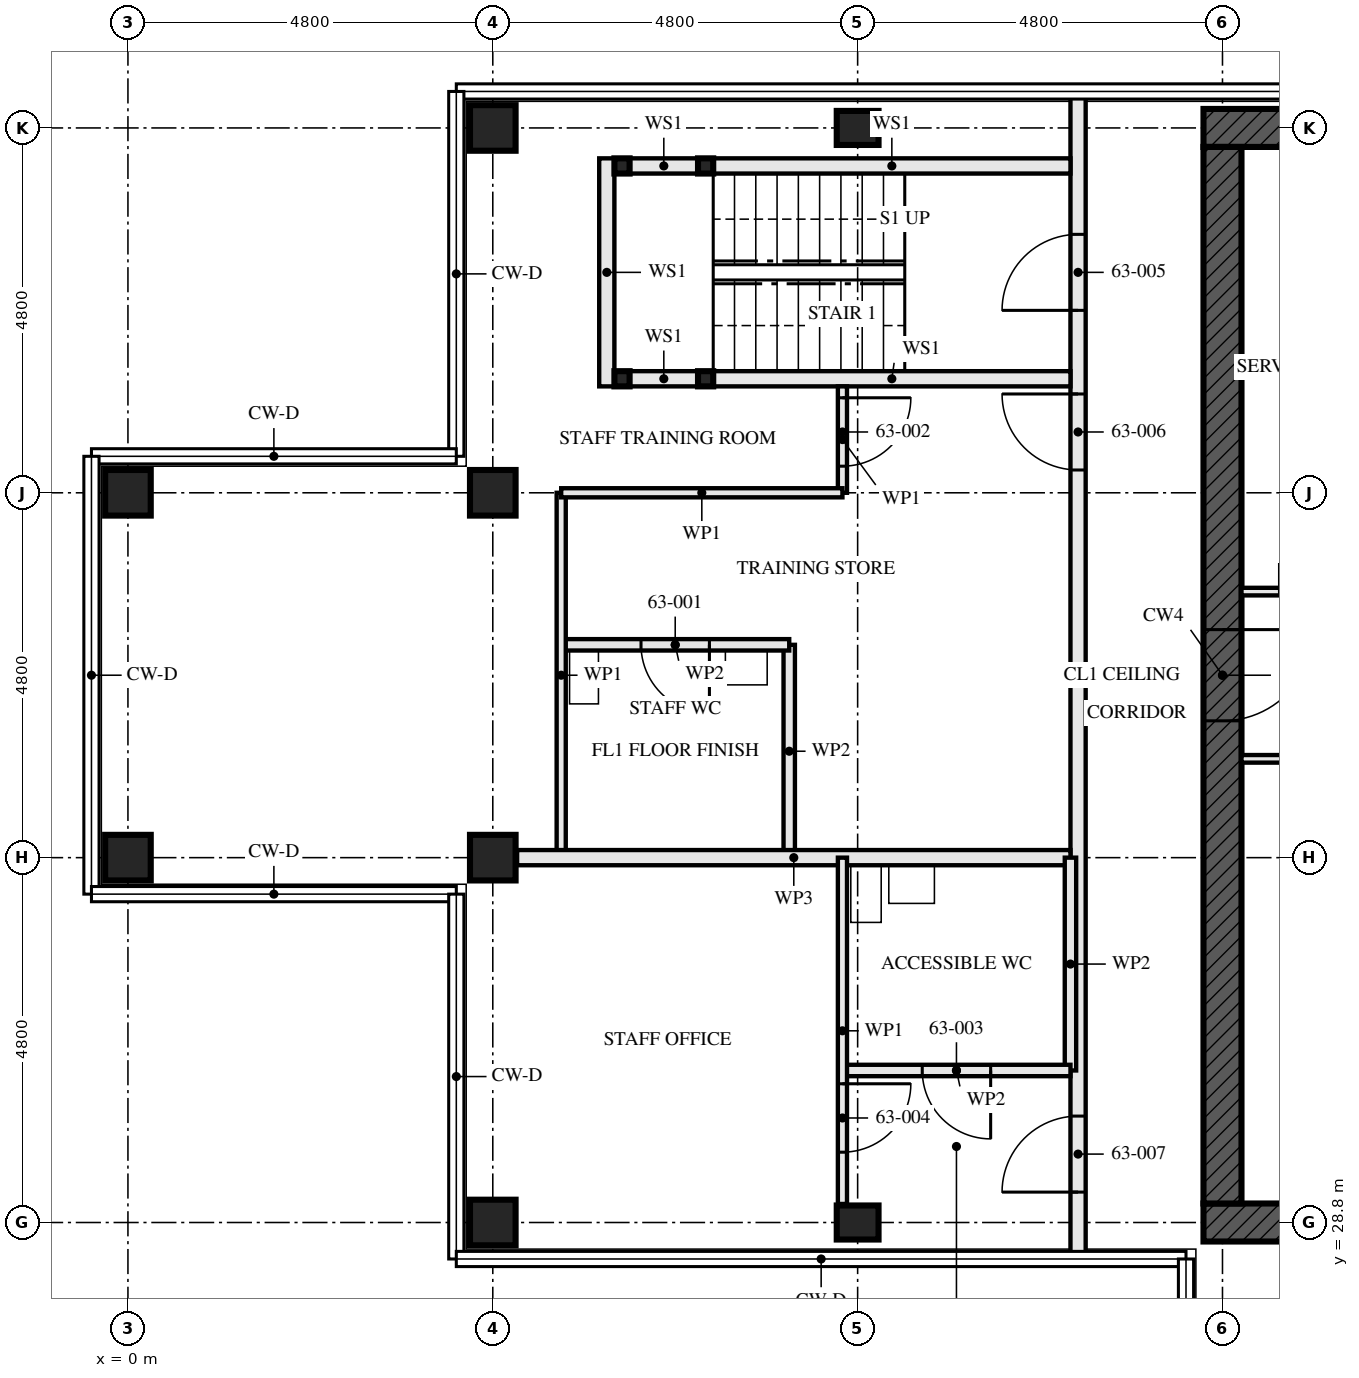
"""IFC4 building model, lengths in metres.
Left out: names, types, materials, properties, quantities, classifications, styles, units other than length and angle.
Written with IfcOpenShell. Run it as: python <this file> out.ifc"""

import sys

from ifc_helpers import new_model, si_unit, direction, frame, frame_2d, origin, origin_2d, place, context, subcontext, project, spatial, rectangle, hollow_rectangle, i_section, extrude, element, fill, save


model = new_model("IFC4")
c1 = context("Model", 3, precision=1e-05, world=origin(), true_north=direction((0.0, 1.0)))
c2 = subcontext(c1, "Body", "Model", "MODEL_VIEW")
j1 = project(units=[si_unit("LENGTHUNIT", "METRE"), si_unit("PLANEANGLEUNIT", "RADIAN")], contexts=[c1])
p1 = place(None, origin())
s1 = spatial("IfcSite", under=j1, at=p1, CompositionType="ELEMENT")
p2 = place(p1, origin())
s2 = spatial("IfcBuilding", under=s1, at=p2, CompositionType="ELEMENT")
p3 = place(p2, frame((0.0, 0.0, 229.5)))
s3 = spatial("IfcBuildingStorey", under=s2, at=p3, CompositionType="ELEMENT", Elevation=229.5)
for number, where, z_axis, x_axis in (
    (1, (0.0, 33.6, 0.0), (0.0, 0.0, 1.0), (0.0, 1.0, 0.0)),
    (2, (0.0, 38.4, 0.0), (0.0, 0.0, 1.0), (0.0, 1.0, 0.0)),
    (3, (4.8, 28.8, 0.0), (0.0, 0.0, 1.0), (0.0, 1.0, 0.0)),
    (4, (4.8, 33.6, 0.0), (0.0, 0.0, 1.0), (0.0, 1.0, 0.0)),
    (5, (4.8, 38.4, 0.0), (0.0, 0.0, 1.0), (0.0, 1.0, 0.0)),
    (6, (4.8, 43.2, 0.0), (0.0, 0.0, 1.0), (0.0, 1.0, 0.0)),
):
    element("IfcColumn", number, at=place(p3, frame(where, z_axis=z_axis, x_axis=x_axis)), inside=s3, PredefinedType="COLUMN", context=c2, shape_type="SweptSolid", body=[
        extrude(hollow_rectangle(XDim=0.6, YDim=0.6, WallThickness=0.05, at=origin_2d()), origin(), (0.0, 0.0, 1.0), 3.5),
    ])
for number, where, z_axis, x_axis in (
    (7, (9.6, 28.8, 0.0), (0.0, 0.0, 1.0), (0.0, 1.0, 0.0)),
    (8, (9.6, 43.2, 0.0), (0.0, 0.0, 1.0), (0.0, 1.0, 0.0)),
):
    element("IfcColumn", number, at=place(p3, frame(where, z_axis=z_axis, x_axis=x_axis)), inside=s3, PredefinedType="COLUMN", context=c2, shape_type="SweptSolid", body=[
        extrude(i_section(OverallWidth=0.448, OverallDepth=0.55, WebThickness=0.072, FlangeThickness=0.115, FilletRadius=0.015, at=origin_2d()), origin(), (0.0, 0.0, 1.0), 3.5),
    ])
p4 = place(p3, frame((14.15, 28.8, -0.17), z_axis=(0.0, 0.0, 1.0), x_axis=(1.0, 0.0, 0.0)))
e9 = element("IfcWall", 9, at=p4, inside=s3, PredefinedType="SHEAR", context=c2, shape_type="SweptSolid", body=[
    extrude(rectangle(XDim=14.9, YDim=0.5, at=frame_2d((7.45, 0.0))), origin(), (0.0, 0.0, 1.0), 3.5),
])
p5 = place(p4, frame((6.85, 0.0, 0.17)))
e10 = element("IfcOpeningElement", 10, at=p5, cuts=e9, PredefinedType="OPENING", context=c2, shape_type="SweptSolid", body=[
    extrude(rectangle(XDim=1.2, YDim=2.1, at=frame_2d((0.6, 1.05))), frame((0.0, 0.26, 0.0), z_axis=(0.0, -1.0, 0.0), x_axis=(1.0, 0.0, 0.0)), (0.0, 0.0, 1.0), 0.521),
])
p6 = place(p3, frame((29.05, 43.2, -0.17), z_axis=(0.0, 0.0, 1.0), x_axis=(-1.0, 0.0, 0.0)))
e11 = element("IfcWall", 11, at=p6, inside=s3, PredefinedType="SHEAR", context=c2, shape_type="SweptSolid", body=[
    extrude(rectangle(XDim=14.9, YDim=0.5, at=frame_2d((7.45, 0.0))), origin(), (0.0, 0.0, 1.0), 3.5),
])
p7 = place(p3, frame((14.4, 42.95, -0.17), z_axis=(0.0, 0.0, 1.0), x_axis=(0.0, -1.0, 0.0)))
e12 = element("IfcWall", 12, at=p7, inside=s3, PredefinedType="SHEAR", context=c2, shape_type="SweptSolid", body=[
    extrude(rectangle(XDim=13.9, YDim=0.5, at=frame_2d((6.95, 0.0))), origin(), (0.0, 0.0, 1.0), 3.5),
])
p8 = place(p7, frame((6.35, 0.0, 0.17)))
e13 = element("IfcOpeningElement", 13, at=p8, cuts=e12, PredefinedType="OPENING", context=c2, shape_type="SweptSolid", body=[
    extrude(rectangle(XDim=1.2, YDim=2.1, at=frame_2d((0.6, 1.05))), frame((0.0, 0.26, 0.0), z_axis=(0.0, -1.0, 0.0), x_axis=(1.0, 0.0, 0.0)), (0.0, 0.0, 1.0), 0.521),
])
for number, where, z_axis, x_axis in (
    (14, (6.5, 42.7, 0.0), (0.0, 0.0, 1.0), (1.0, 0.0, 0.0)),
    (15, (6.5, 39.9, 0.0), (0.0, 0.0, 1.0), (1.0, 0.0, 0.0)),
    (16, (7.6, 42.7, 0.0), (0.0, 0.0, 1.0), (1.0, 0.0, 0.0)),
    (17, (7.6, 39.9, 0.0), (0.0, 0.0, 1.0), (1.0, 0.0, 0.0)),
):
    element("IfcColumn", number, at=place(p3, frame(where, z_axis=z_axis, x_axis=x_axis)), inside=s3, PredefinedType="COLUMN", context=c2, shape_type="SweptSolid", body=[
        extrude(hollow_rectangle(XDim=0.2, YDim=0.2, WallThickness=0.008, at=origin_2d()), origin(), (0.0, 0.0, 1.0), 3.33),
    ])
p9 = place(p3, frame((6.6, 42.7, 0.0), z_axis=(0.0, 0.0, 1.0), x_axis=(1.0, 0.0, 0.0)))
e18 = element("IfcWall", 18, at=p9, inside=s3, PredefinedType="SOLIDWALL", context=c2, shape_type="SweptSolid", body=[
    extrude(rectangle(XDim=0.9, YDim=0.2, at=frame_2d((0.45, 0.0))), origin(), (0.0, 0.0, 1.0), 2.99),
])
p10 = place(p3, frame((7.7, 42.7, 0.0), z_axis=(0.0, 0.0, 1.0), x_axis=(1.0, 0.0, 0.0)))
e19 = element("IfcWall", 19, at=p10, inside=s3, PredefinedType="SOLIDWALL", context=c2, shape_type="SweptSolid", body=[
    extrude(rectangle(XDim=4.7, YDim=0.2, at=frame_2d((2.35, 0.0))), origin(), (0.0, 0.0, 1.0), 2.99),
])
p11 = place(p3, frame((6.6, 39.9, 0.0), z_axis=(0.0, 0.0, 1.0), x_axis=(1.0, 0.0, 0.0)))
e20 = element("IfcWall", 20, at=p11, inside=s3, PredefinedType="SOLIDWALL", context=c2, shape_type="SweptSolid", body=[
    extrude(rectangle(XDim=0.9, YDim=0.2, at=frame_2d((0.45, 0.0))), origin(), (0.0, 0.0, 1.0), 2.99),
])
p12 = place(p3, frame((7.7, 39.9, 0.0), z_axis=(0.0, 0.0, 1.0), x_axis=(1.0, 0.0, 0.0)))
e21 = element("IfcWall", 21, at=p12, inside=s3, PredefinedType="SOLIDWALL", context=c2, shape_type="SweptSolid", body=[
    extrude(rectangle(XDim=4.7, YDim=0.2, at=frame_2d((2.35, 0.0))), origin(), (0.0, 0.0, 1.0), 2.99),
])
p13 = place(p3, frame((6.3, 42.8, 0.0), z_axis=(0.0, 0.0, 1.0), x_axis=(0.0, -1.0, 0.0)))
e22 = element("IfcWall", 22, at=p13, inside=s3, PredefinedType="SOLIDWALL", context=c2, shape_type="SweptSolid", body=[
    extrude(rectangle(XDim=3.0, YDim=0.2, at=frame_2d((1.5, 0.0))), origin(), (0.0, 0.0, 1.0), 3.33),
])
p14 = place(p3, frame((5.7, 36.4, 0.0), z_axis=(0.0, 0.0, 1.0), x_axis=(1.0, 0.0, 0.0)))
e23 = element("IfcWall", 23, at=p14, inside=s3, PredefinedType="PARTITIONING", context=c2, shape_type="SweptSolid", body=[
    extrude(rectangle(XDim=3.0, YDim=0.15, at=frame_2d((1.5, 0.0))), origin(), (0.0, 0.0, 1.0), 3.33),
])
p15 = place(p14, frame((1.05, 0.0, 0.0)))
e24 = element("IfcOpeningElement", 24, at=p15, cuts=e23, PredefinedType="OPENING", context=c2, shape_type="SweptSolid", body=[
    extrude(rectangle(XDim=0.9, YDim=2.1, at=frame_2d((0.45, 1.05))), frame((0.0, 0.085, 0.0), z_axis=(0.0, -1.0, 0.0), x_axis=(1.0, 0.0, 0.0)), (0.0, 0.0, 1.0), 0.171),
])
p16 = place(p3, frame((8.7, 36.4, 0.0), z_axis=(0.0, 0.0, 1.0), x_axis=(0.0, -1.0, 0.0)))
e25 = element("IfcWall", 25, at=p16, inside=s3, PredefinedType="PARTITIONING", context=c2, shape_type="SweptSolid", body=[
    extrude(rectangle(XDim=2.8, YDim=0.15, at=frame_2d((1.4, 0.0))), origin(), (0.0, 0.0, 1.0), 3.33),
])
p17 = place(p3, frame((9.4, 39.8, 0.0), z_axis=(0.0, 0.0, 1.0), x_axis=(0.0, -1.0, 0.0)))
e26 = element("IfcWall", 26, at=p17, inside=s3, PredefinedType="PARTITIONING", context=c2, shape_type="SweptSolid", body=[
    extrude(rectangle(XDim=1.4, YDim=0.12, at=frame_2d((0.7, 0.0))), origin(), (0.0, 0.0, 1.0), 3.33),
])
p18 = place(p17, frame((0.15, 0.0, 0.0)))
e27 = element("IfcOpeningElement", 27, at=p18, cuts=e26, PredefinedType="OPENING", context=c2, shape_type="SweptSolid", body=[
    extrude(rectangle(XDim=0.9, YDim=2.1, at=frame_2d((0.45, 1.05))), frame((0.0, 0.071, 0.0), z_axis=(0.0, -1.0, 0.0), x_axis=(1.0, 0.0, 0.0)), (0.0, 0.0, 1.0), 0.141),
])
p19 = place(p3, frame((5.7, 38.4, 0.0), z_axis=(0.0, 0.0, 1.0), x_axis=(0.0, -1.0, 0.0)))
e28 = element("IfcWall", 28, at=p19, inside=s3, PredefinedType="PARTITIONING", context=c2, shape_type="SweptSolid", body=[
    extrude(rectangle(XDim=4.8, YDim=0.12, at=frame_2d((2.4, 0.0))), origin(), (0.0, 0.0, 1.0), 3.33),
])
p20 = place(p3, frame((5.7, 38.4, 0.0), z_axis=(0.0, 0.0, 1.0), x_axis=(1.0, 0.0, 0.0)))
e29 = element("IfcWall", 29, at=p20, inside=s3, PredefinedType="PARTITIONING", context=c2, shape_type="SweptSolid", body=[
    extrude(rectangle(XDim=3.7, YDim=0.12, at=frame_2d((1.85, 0.0))), origin(), (0.0, 0.0, 1.0), 2.55),
])
p21 = place(p3, frame((5.12, 33.6, 0.0), z_axis=(0.0, 0.0, 1.0), x_axis=(1.0, 0.0, 0.0)))
e30 = element("IfcWall", 30, at=p21, inside=s3, PredefinedType="PARTITIONING", context=c2, shape_type="SweptSolid", body=[
    extrude(rectangle(XDim=7.28, YDim=0.2, at=frame_2d((3.64, 0.0))), origin(), (0.0, 0.0, 1.0), 2.55),
])
p22 = place(p3, frame((9.4, 30.8, 0.0), z_axis=(0.0, 0.0, 1.0), x_axis=(1.0, 0.0, 0.0)))
e31 = element("IfcWall", 31, at=p22, inside=s3, PredefinedType="PARTITIONING", context=c2, shape_type="SweptSolid", body=[
    extrude(rectangle(XDim=3.0, YDim=0.15, at=frame_2d((1.5, 0.0))), origin(), (0.0, 0.0, 1.0), 3.33),
])
p23 = place(p22, frame((1.05, 0.0, 0.0)))
e32 = element("IfcOpeningElement", 32, at=p23, cuts=e31, PredefinedType="OPENING", context=c2, shape_type="SweptSolid", body=[
    extrude(rectangle(XDim=0.9, YDim=2.1, at=frame_2d((0.45, 1.05))), frame((0.0, 0.085, 0.0), z_axis=(0.0, -1.0, 0.0), x_axis=(1.0, 0.0, 0.0)), (0.0, 0.0, 1.0), 0.171),
])
p24 = place(p3, frame((12.4, 33.6, 0.0), z_axis=(0.0, 0.0, 1.0), x_axis=(0.0, -1.0, 0.0)))
e33 = element("IfcWall", 33, at=p24, inside=s3, PredefinedType="PARTITIONING", context=c2, shape_type="SweptSolid", body=[
    extrude(rectangle(XDim=2.8, YDim=0.15, at=frame_2d((1.4, 0.0))), origin(), (0.0, 0.0, 1.0), 3.33),
])
p25 = place(p3, frame((9.4, 33.6, 0.0), z_axis=(0.0, 0.0, 1.0), x_axis=(0.0, -1.0, 0.0)))
e34 = element("IfcWall", 34, at=p25, inside=s3, PredefinedType="PARTITIONING", context=c2, shape_type="SweptSolid", body=[
    extrude(rectangle(XDim=4.556, YDim=0.12, at=frame_2d((2.278, 0.0))), origin(), (0.0, 0.0, 1.0), 3.33),
])
p26 = place(p25, frame((2.975, 0.0, 0.0)))
e35 = element("IfcOpeningElement", 35, at=p26, cuts=e34, PredefinedType="OPENING", context=c2, shape_type="SweptSolid", body=[
    extrude(rectangle(XDim=0.9, YDim=2.1, at=frame_2d((0.45, 1.05))), frame((0.0, 0.071, 0.0), z_axis=(0.0, -1.0, 0.0), x_axis=(1.0, 0.0, 0.0)), (0.0, 0.0, 1.0), 0.141),
])
p27 = place(p3, frame((12.5, 43.655, 0.0), z_axis=(0.0, 0.0, 1.0), x_axis=(0.0, -1.0, 0.0)))
e36 = element("IfcWall", 36, at=p27, inside=s3, PredefinedType="PARTITIONING", context=c2, shape_type="SweptSolid", body=[
    extrude(rectangle(XDim=15.31, YDim=0.2, at=frame_2d((7.655, 0.0))), origin(), (0.0, 0.0, 1.0), 2.32),
])
p28 = place(p27, frame((1.855, 0.0, 0.0)))
e37 = element("IfcOpeningElement", 37, at=p28, cuts=e36, PredefinedType="OPENING", context=c2, shape_type="SweptSolid", body=[
    extrude(rectangle(XDim=1.0, YDim=2.1, at=frame_2d((0.5, 1.05))), frame((0.0, 0.111, 0.0), z_axis=(0.0, -1.0, 0.0), x_axis=(1.0, 0.0, 0.0)), (0.0, 0.0, 1.0), 0.221),
])
p29 = place(p27, frame((3.955, 0.0, 0.0)))
e38 = element("IfcOpeningElement", 38, at=p29, cuts=e36, PredefinedType="OPENING", context=c2, shape_type="SweptSolid", body=[
    extrude(rectangle(XDim=1.0, YDim=2.1, at=frame_2d((0.5, 1.05))), frame((0.0, 0.111, 0.0), z_axis=(0.0, -1.0, 0.0), x_axis=(1.0, 0.0, 0.0)), (0.0, 0.0, 1.0), 0.221),
])
p30 = place(p27, frame((13.455, 0.0, 0.0)))
e39 = element("IfcOpeningElement", 39, at=p30, cuts=e36, PredefinedType="OPENING", context=c2, shape_type="SweptSolid", body=[
    extrude(rectangle(XDim=1.0, YDim=2.1, at=frame_2d((0.5, 1.05))), frame((0.0, 0.111, 0.0), z_axis=(0.0, -1.0, 0.0), x_axis=(1.0, 0.0, 0.0)), (0.0, 0.0, 1.0), 0.221),
])
p31 = place(p3, frame((14.65, 34.9, 0.0), z_axis=(0.0, 0.0, 1.0), x_axis=(1.0, 0.0, 0.0)))
e40 = element("IfcWall", 40, at=p31, inside=s3, PredefinedType="SOLIDWALL", context=c2, shape_type="SweptSolid", body=[
    extrude(rectangle(XDim=5.9, YDim=0.1, at=frame_2d((2.95, 0.0))), origin(), (0.0, 0.0, 1.0), 3.33),
])
p32 = place(p31, frame((1.6, 0.0, 0.0)))
e41 = element("IfcOpeningElement", 41, at=p32, cuts=e40, PredefinedType="OPENING", context=c2, shape_type="SweptSolid", body=[
    extrude(rectangle(XDim=0.7, YDim=2.1, at=frame_2d((0.35, 1.05))), frame((0.0, 0.061, 0.0), z_axis=(0.0, -1.0, 0.0), x_axis=(1.0, 0.0, 0.0)), (0.0, 0.0, 1.0), 0.121),
])
p33 = place(p3, frame((14.65, 37.1, 0.0), z_axis=(0.0, 0.0, 1.0), x_axis=(1.0, 0.0, 0.0)))
e42 = element("IfcWall", 42, at=p33, inside=s3, PredefinedType="SOLIDWALL", context=c2, shape_type="SweptSolid", body=[
    extrude(rectangle(XDim=5.9, YDim=0.1, at=frame_2d((2.95, 0.0))), origin(), (0.0, 0.0, 1.0), 3.33),
])
p34 = place(p33, frame((0.5, 0.0, 0.0)))
e43 = element("IfcOpeningElement", 43, at=p34, cuts=e42, PredefinedType="OPENING", context=c2, shape_type="SweptSolid", body=[
    extrude(rectangle(XDim=0.7, YDim=2.1, at=frame_2d((0.35, 1.05))), frame((0.0, 0.061, 0.0), z_axis=(0.0, -1.0, 0.0), x_axis=(1.0, 0.0, 0.0)), (0.0, 0.0, 1.0), 0.121),
])
p35 = place(p33, frame((1.9, 0.0, 0.0)))
e44 = element("IfcOpeningElement", 44, at=p35, cuts=e42, PredefinedType="OPENING", context=c2, shape_type="SweptSolid", body=[
    extrude(rectangle(XDim=0.9, YDim=2.1, at=frame_2d((0.45, 1.05))), frame((0.0, 0.061, 0.0), z_axis=(0.0, -1.0, 0.0), x_axis=(1.0, 0.0, 0.0)), (0.0, 0.0, 1.0), 0.121),
])
p36 = place(p15, frame((0.9, 0.0, 0.0), z_axis=(0.0, 0.0, 1.0), x_axis=(-1.0, 0.0, 0.0)))
e45 = element("IfcDoor", 45, at=p36, inside=s3, OperationType="SINGLE_SWING_RIGHT", PredefinedType="DOOR", context=c2, shape_type="SweptSolid", body=[
    extrude(rectangle(XDim=0.9, YDim=2.1, at=frame_2d((0.45, 1.05))), frame((0.0, 0.022, 0.0), z_axis=(0.0, -1.0, 0.0), x_axis=(1.0, 0.0, 0.0)), (0.0, 0.0, 1.0), 0.044),
])
fill(e24, e45)
p37 = place(p18, origin())
e46 = element("IfcDoor", 46, at=p37, inside=s3, OperationType="SINGLE_SWING_RIGHT", PredefinedType="DOOR", context=c2, shape_type="SweptSolid", body=[
    extrude(rectangle(XDim=0.9, YDim=2.1, at=frame_2d((0.45, 1.05))), frame((0.0, 0.022, 0.0), z_axis=(0.0, -1.0, 0.0), x_axis=(1.0, 0.0, 0.0)), (0.0, 0.0, 1.0), 0.044),
])
fill(e27, e46)
p38 = place(p23, frame((0.9, 0.0, 0.0), z_axis=(0.0, 0.0, 1.0), x_axis=(-1.0, 0.0, 0.0)))
e47 = element("IfcDoor", 47, at=p38, inside=s3, OperationType="SINGLE_SWING_RIGHT", PredefinedType="DOOR", context=c2, shape_type="SweptSolid", body=[
    extrude(rectangle(XDim=0.9, YDim=2.1, at=frame_2d((0.45, 1.05))), frame((0.0, 0.022, 0.0), z_axis=(0.0, -1.0, 0.0), x_axis=(1.0, 0.0, 0.0)), (0.0, 0.0, 1.0), 0.044),
])
fill(e32, e47)
p39 = place(p26, origin())
e48 = element("IfcDoor", 48, at=p39, inside=s3, OperationType="SINGLE_SWING_RIGHT", PredefinedType="DOOR", context=c2, shape_type="SweptSolid", body=[
    extrude(rectangle(XDim=0.9, YDim=2.1, at=frame_2d((0.45, 1.05))), frame((0.0, 0.022, 0.0), z_axis=(0.0, -1.0, 0.0), x_axis=(1.0, 0.0, 0.0)), (0.0, 0.0, 1.0), 0.044),
])
fill(e35, e48)
p40 = place(p28, frame((1.0, 0.0, 0.0), z_axis=(0.0, 0.0, 1.0), x_axis=(-1.0, 0.0, 0.0)))
e49 = element("IfcDoor", 49, at=p40, inside=s3, OperationType="SINGLE_SWING_RIGHT", PredefinedType="DOOR", context=c2, shape_type="SweptSolid", body=[
    extrude(rectangle(XDim=1.0, YDim=2.1, at=frame_2d((0.5, 1.05))), frame((0.0, 0.032, 0.0), z_axis=(0.0, -1.0, 0.0), x_axis=(1.0, 0.0, 0.0)), (0.0, 0.0, 1.0), 0.064),
])
fill(e37, e49)
p41 = place(p29, frame((1.0, 0.0, 0.0), z_axis=(0.0, 0.0, 1.0), x_axis=(-1.0, 0.0, 0.0)))
e50 = element("IfcDoor", 50, at=p41, inside=s3, OperationType="SINGLE_SWING_LEFT", PredefinedType="DOOR", context=c2, shape_type="SweptSolid", body=[
    extrude(rectangle(XDim=1.0, YDim=2.1, at=frame_2d((0.5, 1.05))), frame((0.0, 0.027, 0.0), z_axis=(0.0, -1.0, 0.0), x_axis=(1.0, 0.0, 0.0)), (0.0, 0.0, 1.0), 0.054),
])
fill(e38, e50)
p42 = place(p30, frame((1.0, 0.0, 0.0), z_axis=(0.0, 0.0, 1.0), x_axis=(-1.0, 0.0, 0.0)))
e51 = element("IfcDoor", 51, at=p42, inside=s3, OperationType="SINGLE_SWING_RIGHT", PredefinedType="DOOR", context=c2, shape_type="SweptSolid", body=[
    extrude(rectangle(XDim=1.0, YDim=2.1, at=frame_2d((0.5, 1.05))), frame((0.0, 0.027, 0.0), z_axis=(0.0, -1.0, 0.0), x_axis=(1.0, 0.0, 0.0)), (0.0, 0.0, 1.0), 0.054),
])
fill(e39, e51)
p43 = place(p8, origin())
e52 = element("IfcDoor", 52, at=p43, inside=s3, OperationType="SINGLE_SWING_LEFT", PredefinedType="DOOR", context=c2, shape_type="SweptSolid", body=[
    extrude(rectangle(XDim=1.2, YDim=2.1, at=frame_2d((0.6, 1.05))), frame((0.0, 0.027, 0.0), z_axis=(0.0, -1.0, 0.0), x_axis=(1.0, 0.0, 0.0)), (0.0, 0.0, 1.0), 0.054),
])
fill(e13, e52)
save(model, sys.argv[1])
